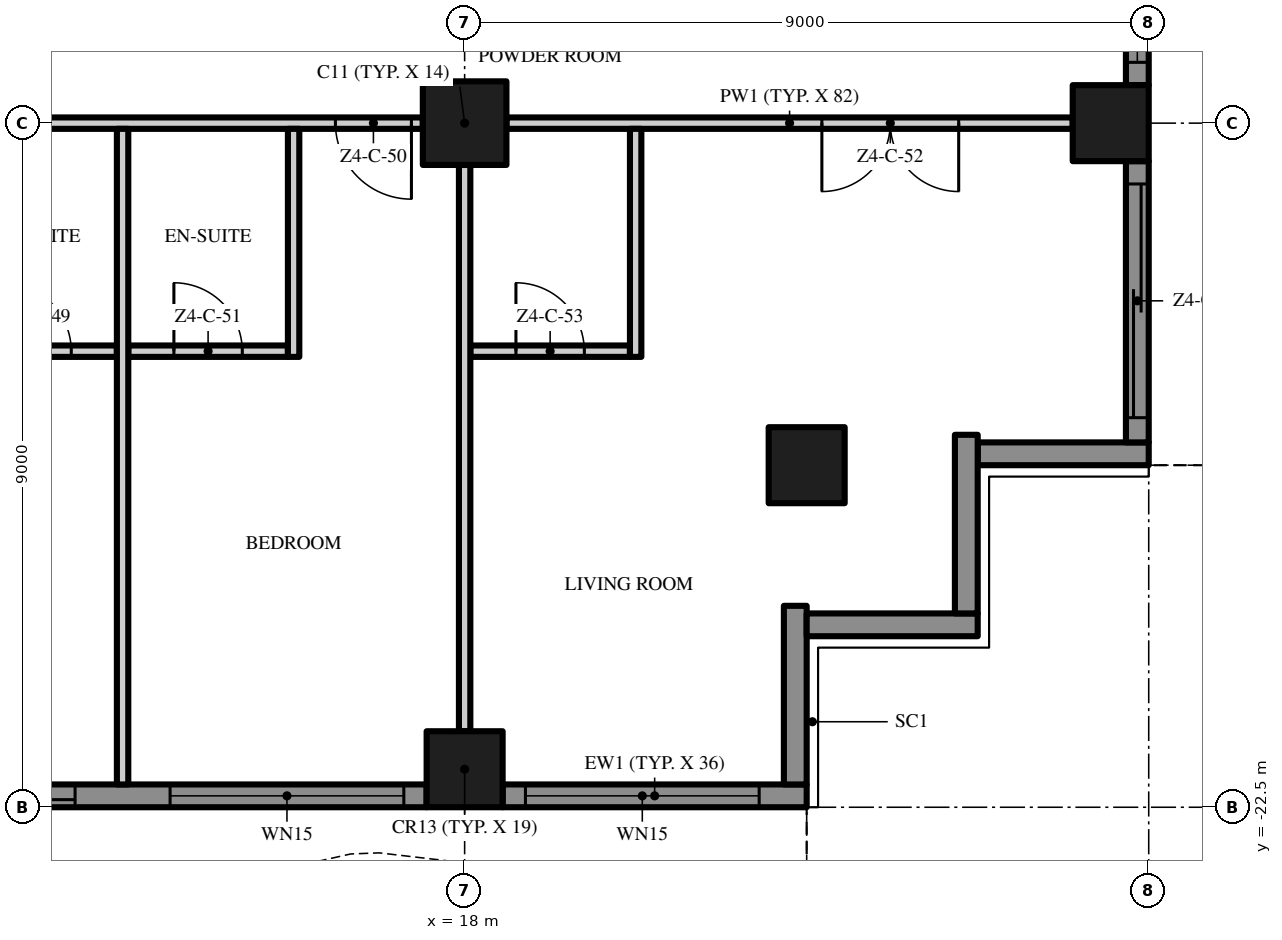
"""IFC4 building model, lengths in metres.
Left out: names, types, materials, properties, quantities, classifications, styles, units other than length and angle.
Written with IfcOpenShell. Run it as: python <this file> out.ifc"""

import sys

from ifc_helpers import new_model, si_unit, direction, frame, frame_2d, origin, origin_2d, place, context, subcontext, project, spatial, polyline, rectangle, outline, extrude, element, fill, save


model = new_model("IFC4")
c1 = context("Model", 3, precision=1e-05, world=origin(), true_north=direction((0.0, 1.0)))
c2 = subcontext(c1, "Body", "Model", "MODEL_VIEW")
j1 = project(units=[si_unit("LENGTHUNIT", "METRE"), si_unit("PLANEANGLEUNIT", "RADIAN")], contexts=[c1])
p1 = place(None, origin())
s1 = spatial("IfcSite", under=j1, at=p1, CompositionType="ELEMENT")
p2 = place(p1, origin())
s2 = spatial("IfcBuilding", under=s1, at=p2, CompositionType="ELEMENT")
p3 = place(p2, frame((0.0, 0.0, 214.8)))
s3 = spatial("IfcBuildingStorey", under=s2, at=p3, CompositionType="ELEMENT", Elevation=214.8)
p4 = place(p3, frame((18.0, -13.5, 0.0), z_axis=(0.0, 0.0, 1.0), x_axis=(1.0, 0.0, 0.0)))
e1 = element("IfcColumn", 1, at=p4, inside=s3, PredefinedType="COLUMN", context=c2, shape_type="SweptSolid", body=[
    extrude(rectangle(XDim=1.1, YDim=1.1, at=origin_2d()), origin(), (0.0, 0.0, 1.0), 3.5),
])
for number, where, z_axis, x_axis in (
    (2, (18.0, -22.0, 0.0), (0.0, 0.0, 1.0), (1.0, 0.0, 0.0)),
    (3, (26.5, -13.5, 0.0), (0.0, 0.0, 1.0), (1.0, 0.0, 0.0)),
    (4, (22.5, -18.0, 0.0), (0.0, 0.0, 1.0), (1.0, 0.0, 0.0)),
):
    element("IfcColumn", number, at=place(p3, frame(where, z_axis=z_axis, x_axis=x_axis)), inside=s3, PredefinedType="COLUMN", context=c2, shape_type="SweptSolid", body=[
        extrude(rectangle(XDim=1.0, YDim=1.0, at=origin_2d()), origin(), (0.0, 0.0, 1.0), 3.5),
    ])
p5 = place(p3, frame((17.5, -22.35, 0.0), z_axis=(0.0, 0.0, 1.0), x_axis=(-1.0, 0.0, 0.0)))
e5 = element("IfcWall", 5, at=p5, inside=s3, PredefinedType="SOLIDWALL", context=c2, shape_type="SweptSolid", body=[
    extrude(rectangle(XDim=8.0, YDim=0.3, at=frame_2d((4.0, 0.0))), origin(), (0.0, 0.0, 1.0), 3.5),
])
p6 = place(p5, frame((4.625, 0.0, 0.0)))
e6 = element("IfcOpeningElement", 6, at=p6, cuts=e5, PredefinedType="OPENING", context=c2, shape_type="SweptSolid", body=[
    extrude(rectangle(XDim=3.075, YDim=2.4, at=frame_2d((1.538, 1.2))), frame((0.0, 0.16, 0.0), z_axis=(0.0, -1.0, 0.0), x_axis=(1.0, 0.0, 0.0)), (0.0, 0.0, 1.0), 0.32),
])
p7 = place(p5, frame((0.3, 0.0, 0.45)))
e7 = element("IfcOpeningElement", 7, at=p7, cuts=e5, PredefinedType="OPENING", context=c2, shape_type="SweptSolid", body=[
    extrude(rectangle(XDim=3.075, YDim=2.65, at=frame_2d((1.538, 1.325))), frame((0.0, 0.16, 0.0), z_axis=(0.0, -1.0, 0.0), x_axis=(1.0, 0.0, 0.0)), (0.0, 0.0, 1.0), 0.32),
])
p8 = place(p3, frame((22.5, -22.35, 0.0), z_axis=(0.0, 0.0, 1.0), x_axis=(-1.0, 0.0, 0.0)))
e8 = element("IfcWall", 8, at=p8, inside=s3, PredefinedType="SOLIDWALL", context=c2, shape_type="SweptSolid", body=[
    extrude(rectangle(XDim=4.0, YDim=0.3, at=frame_2d((2.0, 0.0))), origin(), (0.0, 0.0, 1.0), 3.5),
])
p9 = place(p8, frame((0.625, 0.0, 0.45)))
e9 = element("IfcOpeningElement", 9, at=p9, cuts=e8, PredefinedType="OPENING", context=c2, shape_type="SweptSolid", body=[
    extrude(rectangle(XDim=3.075, YDim=2.65, at=frame_2d((1.538, 1.325))), frame((0.0, 0.16, 0.0), z_axis=(0.0, -1.0, 0.0), x_axis=(1.0, 0.0, 0.0)), (0.0, 0.0, 1.0), 0.32),
])
p10 = place(p3, frame((22.35, -19.85, 0.0), z_axis=(0.0, 0.0, 1.0), x_axis=(0.0, -1.0, 0.0)))
e10 = element("IfcWall", 10, at=p10, inside=s3, PredefinedType="SOLIDWALL", context=c2, shape_type="SweptSolid", body=[
    extrude(rectangle(XDim=2.35, YDim=0.3, at=frame_2d((1.175, 0.0))), origin(), (0.0, 0.0, 1.0), 3.5),
])
p11 = place(p3, frame((24.75, -20.1, 0.0), z_axis=(0.0, 0.0, 1.0), x_axis=(-1.0, 0.0, 0.0)))
e11 = element("IfcWall", 11, at=p11, inside=s3, PredefinedType="SOLIDWALL", context=c2, shape_type="SweptSolid", body=[
    extrude(rectangle(XDim=2.25, YDim=0.3, at=frame_2d((1.125, 0.0))), origin(), (0.0, 0.0, 1.0), 3.5),
])
p12 = place(p3, frame((24.6, -17.6, 0.0), z_axis=(0.0, 0.0, 1.0), x_axis=(0.0, -1.0, 0.0)))
e12 = element("IfcWall", 12, at=p12, inside=s3, PredefinedType="SOLIDWALL", context=c2, shape_type="SweptSolid", body=[
    extrude(rectangle(XDim=2.35, YDim=0.3, at=frame_2d((1.175, 0.0))), origin(), (0.0, 0.0, 1.0), 3.5),
])
p13 = place(p3, frame((27.0, -17.85, 0.0), z_axis=(0.0, 0.0, 1.0), x_axis=(-1.0, 0.0, 0.0)))
e13 = element("IfcWall", 13, at=p13, inside=s3, PredefinedType="SOLIDWALL", context=c2, shape_type="SweptSolid", body=[
    extrude(rectangle(XDim=2.25, YDim=0.3, at=frame_2d((1.125, 0.0))), origin(), (0.0, 0.0, 1.0), 3.5),
])
p14 = place(p3, frame((26.85, -14.0, 0.0), z_axis=(0.0, 0.0, 1.0), x_axis=(0.0, -1.0, 0.0)))
e14 = element("IfcWall", 14, at=p14, inside=s3, PredefinedType="SOLIDWALL", context=c2, shape_type="SweptSolid", body=[
    extrude(rectangle(XDim=3.7, YDim=0.3, at=frame_2d((1.85, 0.0))), origin(), (0.0, 0.0, 1.0), 3.5),
])
p15 = place(p14, frame((0.3, 0.0, 0.0)))
e15 = element("IfcOpeningElement", 15, at=p15, cuts=e14, PredefinedType="OPENING", context=c2, shape_type="SweptSolid", body=[
    extrude(rectangle(XDim=3.075, YDim=2.4, at=frame_2d((1.538, 1.2))), frame((0.0, 0.16, 0.0), z_axis=(0.0, -1.0, 0.0), x_axis=(1.0, 0.0, 0.0)), (0.0, 0.0, 1.0), 0.32),
])
p16 = place(p3, frame((26.85, -5.0, 0.0), z_axis=(0.0, 0.0, 1.0), x_axis=(0.0, -1.0, 0.0)))
e16 = element("IfcWall", 16, at=p16, inside=s3, PredefinedType="SOLIDWALL", context=c2, shape_type="SweptSolid", body=[
    extrude(rectangle(XDim=8.0, YDim=0.3, at=frame_2d((4.0, 0.0))), origin(), (0.0, 0.0, 1.0), 3.5),
])
p17 = place(p16, frame((4.625, 0.0, 0.45)))
e17 = element("IfcOpeningElement", 17, at=p17, cuts=e16, PredefinedType="OPENING", context=c2, shape_type="SweptSolid", body=[
    extrude(rectangle(XDim=3.075, YDim=2.65, at=frame_2d((1.538, 1.325))), frame((0.0, 0.16, 0.0), z_axis=(0.0, -1.0, 0.0), x_axis=(1.0, 0.0, 0.0)), (0.0, 0.0, 1.0), 0.32),
])
p18 = place(p16, frame((0.3, 0.0, 0.45)))
e18 = element("IfcOpeningElement", 18, at=p18, cuts=e16, PredefinedType="OPENING", context=c2, shape_type="SweptSolid", body=[
    extrude(rectangle(XDim=3.075, YDim=2.65, at=frame_2d((1.538, 1.325))), frame((0.0, 0.16, 0.0), z_axis=(0.0, -1.0, 0.0), x_axis=(1.0, 0.0, 0.0)), (0.0, 0.0, 1.0), 0.32),
])
p19 = place(p3, origin())
e19 = element("IfcWall", 19, at=p19, inside=s3, PredefinedType="USERDEFINED", context=c2, shape_type="SweptSolid", body=[
    extrude(outline(polyline([(-22.5, -25.149), (-21.0, -25.485), (-20.625, -25.5), (-19.5, -25.369), (-18.0, -24.845), (-16.5, -24.112), (-15.0, -23.451), (-13.5, -23.115), (-13.125, -23.1), (-12.0, -23.231), (-10.5, -23.755), (-9.0, -24.488), (-7.5, -25.149), (-6.0, -25.485), (-5.625, -25.5), (-4.5, -25.369), (-3.0, -24.845), (-1.5, -24.112), (0.0, -23.451), (1.5, -23.115), (1.875, -23.1), (3.0, -23.231), (4.5, -23.755), (6.0, -24.488), (7.5, -25.149), (9.0, -25.485), (9.375, -25.5), (10.5, -25.369), (12.0, -24.845), (13.5, -24.112), (15.0, -23.451), (16.5, -23.115), (16.875, -23.1), (18.0, -23.231), (19.5, -23.755), (21.0, -24.488), (22.5, -25.149), (22.601, -24.92), (21.105, -24.261), (19.596, -23.524), (18.056, -22.986), (16.885, -22.849), (16.467, -22.866), (14.921, -23.213), (13.395, -23.885), (11.904, -24.614), (10.444, -25.124), (9.365, -25.249), (9.033, -25.236), (7.579, -24.91), (6.105, -24.261), (4.596, -23.524), (3.056, -22.986), (1.885, -22.849), (1.467, -22.866), (-0.079, -23.213), (-1.605, -23.885), (-3.096, -24.614), (-4.556, -25.124), (-5.635, -25.249), (-5.967, -25.236), (-7.421, -24.91), (-8.895, -24.261), (-10.404, -23.524), (-11.944, -22.986), (-13.115, -22.849), (-13.533, -22.866), (-15.079, -23.213), (-16.605, -23.885), (-18.096, -24.614), (-19.556, -25.124), (-20.635, -25.249), (-20.967, -25.236), (-22.445, -24.905), (-22.5, -25.149)])), origin(), (0.0, 0.0, 1.0), 0.9),
])
p20 = place(p3, origin())
e20 = element("IfcWall", 20, at=p20, inside=s3, PredefinedType="USERDEFINED", context=c2, shape_type="SweptSolid", body=[
    extrude(outline(polyline([(29.649, -18.0), (29.985, -16.5), (30.0, -16.125), (29.869, -15.0), (29.345, -13.5), (28.612, -12.0), (27.951, -10.5), (27.615, -9.0), (27.6, -8.625), (27.731, -7.5), (28.255, -6.0), (28.988, -4.5), (29.649, -3.0), (29.985, -1.5), (30.0, -1.125), (29.869, 0.0), (29.345, 1.5), (28.612, 3.0), (27.951, 4.5), (27.615, 6.0), (27.6, 6.375), (27.731, 7.5), (28.255, 9.0), (28.988, 10.5), (29.649, 12.0), (29.985, 13.5), (30.0, 13.875), (29.869, 15.0), (29.345, 16.5), (28.612, 18.0), (28.388, 17.89), (29.114, 16.404), (29.624, 14.944), (29.749, 13.865), (29.736, 13.533), (29.41, 12.079), (28.761, 10.605), (28.024, 9.096), (27.486, 7.556), (27.349, 6.385), (27.366, 5.967), (27.713, 4.421), (28.385, 2.895), (29.114, 1.404), (29.624, -0.056), (29.749, -1.135), (29.736, -1.467), (29.41, -2.921), (28.761, -4.395), (28.024, -5.904), (27.486, -7.444), (27.349, -8.615), (27.366, -9.033), (27.713, -10.579), (28.385, -12.105), (29.114, -13.596), (29.624, -15.056), (29.749, -16.135), (29.736, -16.467), (29.405, -17.945), (29.649, -18.0)])), origin(), (0.0, 0.0, 1.0), 0.9),
])
p21 = place(p3, frame((11.325, -16.5, 0.0), z_axis=(0.0, 0.0, 1.0), x_axis=(1.0, 0.0, 0.0)))
e21 = element("IfcWall", 21, at=p21, inside=s3, PredefinedType="PARTITIONING", context=c2, shape_type="SweptSolid", body=[
    extrude(rectangle(XDim=2.1, YDim=0.15, at=frame_2d((1.05, 0.0))), origin(), (0.0, 0.0, 1.0), 3.5),
])
p22 = place(p21, frame((0.6, 0.0, 0.0)))
e22 = element("IfcOpeningElement", 22, at=p22, cuts=e21, PredefinedType="OPENING", context=c2, shape_type="SweptSolid", body=[
    extrude(rectangle(XDim=0.9, YDim=2.1, at=frame_2d((0.45, 1.05))), frame((0.0, 0.085, 0.0), z_axis=(0.0, -1.0, 0.0), x_axis=(1.0, 0.0, 0.0)), (0.0, 0.0, 1.0), 0.17),
])
p23 = place(p3, frame((13.575, -16.5, 0.0), z_axis=(0.0, 0.0, 1.0), x_axis=(1.0, 0.0, 0.0)))
e23 = element("IfcWall", 23, at=p23, inside=s3, PredefinedType="PARTITIONING", context=c2, shape_type="SweptSolid", body=[
    extrude(rectangle(XDim=2.1, YDim=0.15, at=frame_2d((1.05, 0.0))), origin(), (0.0, 0.0, 1.0), 3.5),
])
p24 = place(p23, frame((0.6, 0.0, 0.0)))
e24 = element("IfcOpeningElement", 24, at=p24, cuts=e23, PredefinedType="OPENING", context=c2, shape_type="SweptSolid", body=[
    extrude(rectangle(XDim=0.9, YDim=2.1, at=frame_2d((0.45, 1.05))), frame((0.0, 0.085, 0.0), z_axis=(0.0, -1.0, 0.0), x_axis=(1.0, 0.0, 0.0)), (0.0, 0.0, 1.0), 0.17),
])
p25 = place(p3, frame((18.075, -16.5, 0.0), z_axis=(0.0, 0.0, 1.0), x_axis=(1.0, 0.0, 0.0)))
e25 = element("IfcWall", 25, at=p25, inside=s3, PredefinedType="PARTITIONING", context=c2, shape_type="SweptSolid", body=[
    extrude(rectangle(XDim=2.1, YDim=0.15, at=frame_2d((1.05, 0.0))), origin(), (0.0, 0.0, 1.0), 3.5),
])
p26 = place(p25, frame((0.6, 0.0, 0.0)))
e26 = element("IfcOpeningElement", 26, at=p26, cuts=e25, PredefinedType="OPENING", context=c2, shape_type="SweptSolid", body=[
    extrude(rectangle(XDim=0.9, YDim=2.1, at=frame_2d((0.45, 1.05))), frame((0.0, 0.085, 0.0), z_axis=(0.0, -1.0, 0.0), x_axis=(1.0, 0.0, 0.0)), (0.0, 0.0, 1.0), 0.17),
])
p27 = place(p3, frame((17.45, -13.5, 0.0), z_axis=(0.0, 0.0, 1.0), x_axis=(-1.0, 0.0, 0.0)))
e27 = element("IfcWall", 27, at=p27, inside=s3, PredefinedType="PARTITIONING", context=c2, shape_type="SweptSolid", body=[
    extrude(rectangle(XDim=7.9, YDim=0.15, at=frame_2d((3.95, 0.0))), origin(), (0.0, 0.0, 1.0), 3.5),
])
p28 = place(p27, frame((6.75, 0.0, 0.0)))
e28 = element("IfcOpeningElement", 28, at=p28, cuts=e27, PredefinedType="OPENING", context=c2, shape_type="SweptSolid", body=[
    extrude(rectangle(XDim=1.0, YDim=2.4, at=frame_2d((0.5, 1.2))), frame((0.0, 0.085, 0.0), z_axis=(0.0, -1.0, 0.0), x_axis=(1.0, 0.0, 0.0)), (0.0, 0.0, 1.0), 0.17),
])
p29 = place(p27, frame((0.15, 0.0, 0.0)))
e29 = element("IfcOpeningElement", 29, at=p29, cuts=e27, PredefinedType="OPENING", context=c2, shape_type="SweptSolid", body=[
    extrude(rectangle(XDim=1.0, YDim=2.4, at=frame_2d((0.5, 1.2))), frame((0.0, 0.085, 0.0), z_axis=(0.0, -1.0, 0.0), x_axis=(1.0, 0.0, 0.0)), (0.0, 0.0, 1.0), 0.17),
])
p30 = place(p3, frame((26.0, -13.5, 0.0), z_axis=(0.0, 0.0, 1.0), x_axis=(-1.0, 0.0, 0.0)))
e30 = element("IfcWall", 30, at=p30, inside=s3, PredefinedType="PARTITIONING", context=c2, shape_type="SweptSolid", body=[
    extrude(rectangle(XDim=7.45, YDim=0.15, at=frame_2d((3.725, 0.0))), origin(), (0.0, 0.0, 1.0), 3.5),
])
p31 = place(p30, frame((1.5, 0.0, 0.0)))
e31 = element("IfcOpeningElement", 31, at=p31, cuts=e30, PredefinedType="OPENING", context=c2, shape_type="SweptSolid", body=[
    extrude(rectangle(XDim=1.8, YDim=2.4, at=frame_2d((0.9, 1.2))), frame((0.0, 0.085, 0.0), z_axis=(0.0, -1.0, 0.0), x_axis=(1.0, 0.0, 0.0)), (0.0, 0.0, 1.0), 0.17),
])
p32 = place(p3, frame((13.5, -22.2, 0.0), z_axis=(0.0, 0.0, 1.0), x_axis=(0.0, 1.0, 0.0)))
e32 = element("IfcWall", 32, at=p32, inside=s3, PredefinedType="PARTITIONING", context=c2, shape_type="SweptSolid", body=[
    extrude(rectangle(XDim=8.625, YDim=0.15, at=frame_2d((4.312, 0.0))), origin(), (0.0, 0.0, 1.0), 3.5),
])
p33 = place(p3, frame((15.75, -16.575, 0.0), z_axis=(0.0, 0.0, 1.0), x_axis=(0.0, 1.0, 0.0)))
e33 = element("IfcWall", 33, at=p33, inside=s3, PredefinedType="PARTITIONING", context=c2, shape_type="SweptSolid", body=[
    extrude(rectangle(XDim=3.0, YDim=0.15, at=frame_2d((1.5, 0.0))), origin(), (0.0, 0.0, 1.0), 3.5),
])
p34 = place(p3, frame((18.0, -21.5, 0.0), z_axis=(0.0, 0.0, 1.0), x_axis=(0.0, 1.0, 0.0)))
e34 = element("IfcWall", 34, at=p34, inside=s3, PredefinedType="PARTITIONING", context=c2, shape_type="SweptSolid", body=[
    extrude(rectangle(XDim=7.45, YDim=0.15, at=frame_2d((3.725, 0.0))), origin(), (0.0, 0.0, 1.0), 3.5),
])
p35 = place(p3, frame((20.25, -16.575, 0.0), z_axis=(0.0, 0.0, 1.0), x_axis=(0.0, 1.0, 0.0)))
e35 = element("IfcWall", 35, at=p35, inside=s3, PredefinedType="PARTITIONING", context=c2, shape_type="SweptSolid", body=[
    extrude(rectangle(XDim=3.0, YDim=0.15, at=frame_2d((1.5, 0.0))), origin(), (0.0, 0.0, 1.0), 3.5),
])
p36 = place(p6, origin())
e36 = element("IfcDoor", 36, at=p36, inside=s3, OperationType="SINGLE_SWING_LEFT", PredefinedType="DOOR", context=c2, shape_type="SweptSolid", body=[
    extrude(rectangle(XDim=3.075, YDim=2.4, at=frame_2d((1.538, 1.2))), frame((0.0, 0.025, 0.0), z_axis=(0.0, -1.0, 0.0), x_axis=(1.0, 0.0, 0.0)), (0.0, 0.0, 1.0), 0.05),
])
fill(e6, e36)
p37 = place(p7, origin())
e37 = element("IfcWindow", 37, at=p37, inside=s3, PartitioningType="SINGLE_PANEL", PredefinedType="WINDOW", context=c2, shape_type="SweptSolid", body=[
    extrude(rectangle(XDim=3.075, YDim=2.65, at=frame_2d((1.538, 1.325))), frame((0.0, 0.03, 0.0), z_axis=(0.0, -1.0, 0.0), x_axis=(1.0, 0.0, 0.0)), (0.0, 0.0, 1.0), 0.06),
])
fill(e7, e37)
p38 = place(p9, origin())
e38 = element("IfcWindow", 38, at=p38, inside=s3, PartitioningType="SINGLE_PANEL", PredefinedType="WINDOW", context=c2, shape_type="SweptSolid", body=[
    extrude(rectangle(XDim=3.075, YDim=2.65, at=frame_2d((1.538, 1.325))), frame((0.0, 0.03, 0.0), z_axis=(0.0, -1.0, 0.0), x_axis=(1.0, 0.0, 0.0)), (0.0, 0.0, 1.0), 0.06),
])
fill(e9, e38)
p39 = place(p15, origin())
e39 = element("IfcDoor", 39, at=p39, inside=s3, OperationType="SINGLE_SWING_LEFT", PredefinedType="DOOR", context=c2, shape_type="SweptSolid", body=[
    extrude(rectangle(XDim=3.075, YDim=2.4, at=frame_2d((1.538, 1.2))), frame((0.0, 0.025, 0.0), z_axis=(0.0, -1.0, 0.0), x_axis=(1.0, 0.0, 0.0)), (0.0, 0.0, 1.0), 0.05),
])
fill(e15, e39)
p40 = place(p17, origin())
e40 = element("IfcWindow", 40, at=p40, inside=s3, PartitioningType="SINGLE_PANEL", PredefinedType="WINDOW", context=c2, shape_type="SweptSolid", body=[
    extrude(rectangle(XDim=3.075, YDim=2.65, at=frame_2d((1.538, 1.325))), frame((0.0, 0.03, 0.0), z_axis=(0.0, -1.0, 0.0), x_axis=(1.0, 0.0, 0.0)), (0.0, 0.0, 1.0), 0.06),
])
fill(e17, e40)
p41 = place(p22, origin())
e41 = element("IfcDoor", 41, at=p41, inside=s3, OperationType="SINGLE_SWING_LEFT", PredefinedType="DOOR", context=c2, shape_type="SweptSolid", body=[
    extrude(rectangle(XDim=0.9, YDim=2.1, at=frame_2d((0.45, 1.05))), frame((0.0, 0.025, 0.0), z_axis=(0.0, -1.0, 0.0), x_axis=(1.0, 0.0, 0.0)), (0.0, 0.0, 1.0), 0.05),
])
fill(e22, e41)
p42 = place(p29, origin())
e42 = element("IfcDoor", 42, at=p42, inside=s3, OperationType="SINGLE_SWING_LEFT", PredefinedType="DOOR", context=c2, shape_type="SweptSolid", body=[
    extrude(rectangle(XDim=1.0, YDim=2.4, at=frame_2d((0.5, 1.2))), frame((0.0, 0.025, 0.0), z_axis=(0.0, -1.0, 0.0), x_axis=(1.0, 0.0, 0.0)), (0.0, 0.0, 1.0), 0.05),
])
fill(e29, e42)
p43 = place(p24, origin())
e43 = element("IfcDoor", 43, at=p43, inside=s3, OperationType="SINGLE_SWING_LEFT", PredefinedType="DOOR", context=c2, shape_type="SweptSolid", body=[
    extrude(rectangle(XDim=0.9, YDim=2.1, at=frame_2d((0.45, 1.05))), frame((0.0, 0.025, 0.0), z_axis=(0.0, -1.0, 0.0), x_axis=(1.0, 0.0, 0.0)), (0.0, 0.0, 1.0), 0.05),
])
fill(e24, e43)
p44 = place(p31, origin())
e44 = element("IfcDoor", 44, at=p44, inside=s3, OperationType="DOUBLE_DOOR_SINGLE_SWING", PredefinedType="DOOR", context=c2, shape_type="SweptSolid", body=[
    extrude(rectangle(XDim=1.8, YDim=2.4, at=frame_2d((0.9, 1.2))), frame((0.0, 0.025, 0.0), z_axis=(0.0, -1.0, 0.0), x_axis=(1.0, 0.0, 0.0)), (0.0, 0.0, 1.0), 0.05),
])
fill(e31, e44)
p45 = place(p26, origin())
e45 = element("IfcDoor", 45, at=p45, inside=s3, OperationType="SINGLE_SWING_LEFT", PredefinedType="DOOR", context=c2, shape_type="SweptSolid", body=[
    extrude(rectangle(XDim=0.9, YDim=2.1, at=frame_2d((0.45, 1.05))), frame((0.0, 0.025, 0.0), z_axis=(0.0, -1.0, 0.0), x_axis=(1.0, 0.0, 0.0)), (0.0, 0.0, 1.0), 0.05),
])
fill(e26, e45)
save(model, sys.argv[1])
